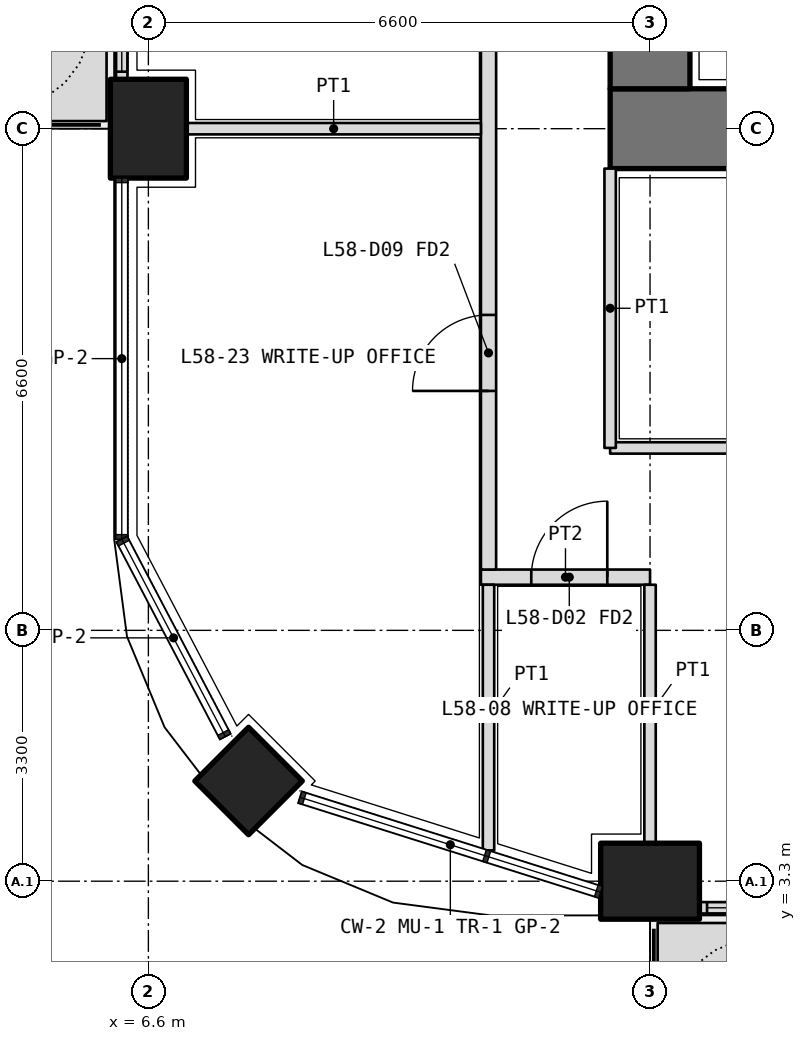
"""IFC4 building model, lengths in metres.
Left out: names, types, materials, properties, quantities, classifications, styles, units other than length and angle.
Written with IfcOpenShell. Run it as: python <this file> out.ifc"""

import sys

from ifc_helpers import new_model, si_unit, direction, frame, frame_2d, origin, origin_2d, place, context, subcontext, project, spatial, polyline, rectangle, outline, extrude, element, fill, save


model = new_model("IFC4")
c1 = context("Model", 3, precision=1e-05, world=origin(), true_north=direction((0.0, 1.0)))
c2 = subcontext(c1, "Body", "Model", "MODEL_VIEW")
j1 = project(units=[si_unit("LENGTHUNIT", "METRE"), si_unit("PLANEANGLEUNIT", "RADIAN")], contexts=[c1])
p1 = place(None, origin())
s1 = spatial("IfcSite", under=j1, at=p1, CompositionType="ELEMENT")
p2 = place(p1, origin())
s2 = spatial("IfcBuilding", under=s1, at=p2, CompositionType="ELEMENT")
p3 = place(p2, frame((0.0, 0.0, 254.4)))
s3 = spatial("IfcBuildingStorey", under=s2, at=p3, CompositionType="ELEMENT", Elevation=254.4)
p4 = place(p3, frame((7.918, 4.618, 0.0), z_axis=(0.0, 0.0, 1.0), x_axis=(0.707106781187, 0.707106781187, 0.0)))
e1 = element("IfcColumn", 1, at=p4, inside=s3, PredefinedType="COLUMN", context=c2, shape_type="SweptSolid", body=[
    extrude(rectangle(XDim=1.0, YDim=1.0, at=origin_2d()), origin(), (0.0, 0.0, 1.0), 4.2),
])
for number, where, z_axis, x_axis in (
    (2, (13.2, 3.3, 0.0), (0.0, 0.0, 1.0), (1.0, 0.0, 0.0)),
    (3, (6.6, 13.2, 0.0), (0.0, 0.0, 1.0), (0.0, 1.0, 0.0)),
):
    element("IfcColumn", number, at=place(p3, frame(where, z_axis=z_axis, x_axis=x_axis)), inside=s3, PredefinedType="COLUMN", context=c2, shape_type="SweptSolid", body=[
        extrude(rectangle(XDim=1.3, YDim=1.0, at=origin_2d()), origin(), (0.0, 0.0, 1.0), 4.2),
    ])
p5 = place(p3, origin())
e4 = element("IfcWall", 4, at=p5, inside=s3, PredefinedType="USERDEFINED", context=c2, shape_type="SweptSolid", body=[
    extrude(outline(polyline([(13.3, 1.75), (15.75, 1.75), (15.75, 2.75), (13.3, 2.75), (13.3, 1.75)]), holes=[polyline([(13.45, 1.9), (15.6, 1.9), (15.6, 2.6), (13.45, 2.6), (13.45, 1.9)])]), origin(), (0.0, 0.0, 1.0), 1.05),
])
p6 = place(p3, origin())
e5 = element("IfcWall", 5, at=p6, inside=s3, PredefinedType="USERDEFINED", context=c2, shape_type="SweptSolid", body=[
    extrude(outline(polyline([(5.05, 13.3), (6.05, 13.3), (6.05, 15.75), (5.05, 15.75), (5.05, 13.3)]), holes=[polyline([(5.2, 13.45), (5.9, 13.45), (5.9, 15.6), (5.2, 15.6), (5.2, 13.45)])]), origin(), (0.0, 0.0, 1.0), 1.05),
])
p7 = place(p3, frame((13.85, 2.95, 0.0), z_axis=(0.0, 0.0, 1.0), x_axis=(1.0, 0.0, 0.0)))
e6 = element("IfcWall", 6, at=p7, inside=s3, PredefinedType="SOLIDWALL", context=c2, shape_type="SweptSolid", body=[
    extrude(rectangle(XDim=5.3, YDim=0.15, at=frame_2d((2.65, 0.0))), origin(), (0.0, 0.0, 1.0), 2.7),
])
p8 = place(p7, frame((2.9, 0.0, 0.0)))
e7 = element("IfcOpeningElement", 7, at=p8, cuts=e6, PredefinedType="OPENING", context=c2, shape_type="SweptSolid", body=[
    extrude(rectangle(XDim=1.0, YDim=2.4, at=frame_2d((0.5, 1.2))), frame((0.0, 0.085, 0.0), z_axis=(0.0, -1.0, 0.0), x_axis=(1.0, 0.0, 0.0)), (0.0, 0.0, 1.0), 0.17),
])
p9 = place(p7, frame((0.1, 0.0, 0.1)))
e8 = element("IfcOpeningElement", 8, at=p9, cuts=e6, PredefinedType="OPENING", context=c2, shape_type="SweptSolid", body=[
    extrude(rectangle(XDim=2.3, YDim=2.3, at=frame_2d((1.15, 1.15))), frame((0.0, 0.085, 0.0), z_axis=(0.0, -1.0, 0.0), x_axis=(1.0, 0.0, 0.0)), (0.0, 0.0, 1.0), 0.17),
])
p10 = place(p7, frame((4.0, 0.0, 0.1)))
e9 = element("IfcOpeningElement", 9, at=p10, cuts=e6, PredefinedType="OPENING", context=c2, shape_type="SweptSolid", body=[
    extrude(rectangle(XDim=1.2, YDim=2.3, at=frame_2d((0.6, 1.15))), frame((0.0, 0.085, 0.0), z_axis=(0.0, -1.0, 0.0), x_axis=(1.0, 0.0, 0.0)), (0.0, 0.0, 1.0), 0.17),
])
p11 = place(p3, frame((6.25, 19.15, 0.0), z_axis=(0.0, 0.0, 1.0), x_axis=(0.0, -1.0, 0.0)))
e10 = element("IfcWall", 10, at=p11, inside=s3, PredefinedType="SOLIDWALL", context=c2, shape_type="SweptSolid", body=[
    extrude(rectangle(XDim=5.3, YDim=0.15, at=frame_2d((2.65, 0.0))), origin(), (0.0, 0.0, 1.0), 2.7),
])
p12 = place(p11, frame((1.4, 0.0, 0.0)))
e11 = element("IfcOpeningElement", 11, at=p12, cuts=e10, PredefinedType="OPENING", context=c2, shape_type="SweptSolid", body=[
    extrude(rectangle(XDim=1.0, YDim=2.4, at=frame_2d((0.5, 1.2))), frame((0.0, 0.085, 0.0), z_axis=(0.0, -1.0, 0.0), x_axis=(1.0, 0.0, 0.0)), (0.0, 0.0, 1.0), 0.17),
])
p13 = place(p11, frame((0.1, 0.0, 0.1)))
e12 = element("IfcOpeningElement", 12, at=p13, cuts=e10, PredefinedType="OPENING", context=c2, shape_type="SweptSolid", body=[
    extrude(rectangle(XDim=1.2, YDim=2.3, at=frame_2d((0.6, 1.15))), frame((0.0, 0.085, 0.0), z_axis=(0.0, -1.0, 0.0), x_axis=(1.0, 0.0, 0.0)), (0.0, 0.0, 1.0), 0.17),
])
p14 = place(p11, frame((2.9, 0.0, 0.1)))
e13 = element("IfcOpeningElement", 13, at=p14, cuts=e10, PredefinedType="OPENING", context=c2, shape_type="SweptSolid", body=[
    extrude(rectangle(XDim=2.3, YDim=2.3, at=frame_2d((1.15, 1.15))), frame((0.0, 0.085, 0.0), z_axis=(0.0, -1.0, 0.0), x_axis=(1.0, 0.0, 0.0)), (0.0, 0.0, 1.0), 0.17),
])
p15 = place(p3, frame((12.675, 13.2, 0.0), z_axis=(0.0, 0.0, 1.0), x_axis=(1.0, 0.0, 0.0)))
e14 = element("IfcWall", 14, at=p15, inside=s3, PredefinedType="SHEAR", context=c2, shape_type="SweptSolid", body=[
    extrude(rectangle(XDim=27.45, YDim=1.05, at=frame_2d((13.725, 0.0))), origin(), (0.0, 0.0, 1.0), 4.2),
])
p16 = place(p3, frame((13.2, 32.475, 0.0), z_axis=(0.0, 0.0, 1.0), x_axis=(0.0, -1.0, 0.0)))
e15 = element("IfcWall", 15, at=p16, inside=s3, PredefinedType="SHEAR", context=c2, shape_type="SweptSolid", body=[
    extrude(rectangle(XDim=18.75, YDim=1.05, at=frame_2d((9.375, 0.0))), origin(), (0.0, 0.0, 1.0), 4.2),
])
p17 = place(p16, frame((14.125, 0.0, 0.0)))
e16 = element("IfcOpeningElement", 16, at=p17, cuts=e15, PredefinedType="OPENING", context=c2, shape_type="SweptSolid", body=[
    extrude(rectangle(XDim=1.6, YDim=2.1, at=frame_2d((0.8, 1.05))), frame((0.0, 0.535, 0.0), z_axis=(0.0, -1.0, 0.0), x_axis=(1.0, 0.0, 0.0)), (0.0, 0.0, 1.0), 1.07),
])
p18 = place(p16, frame((3.325, 0.0, 0.0)))
e17 = element("IfcOpeningElement", 17, at=p18, cuts=e15, PredefinedType="OPENING", context=c2, shape_type="SweptSolid", body=[
    extrude(rectangle(XDim=1.6, YDim=2.1, at=frame_2d((0.8, 1.05))), frame((0.0, 0.535, 0.0), z_axis=(0.0, -1.0, 0.0), x_axis=(1.0, 0.0, 0.0)), (0.0, 0.0, 1.0), 1.07),
])
p19 = place(p3, frame((12.675, 9.0, 0.0), z_axis=(0.0, 0.0, 1.0), x_axis=(1.0, 0.0, 0.0)))
e18 = element("IfcWall", 18, at=p19, inside=s3, PredefinedType="PARTITIONING", context=c2, shape_type="SweptSolid", body=[
    extrude(rectangle(XDim=27.45, YDim=0.15, at=frame_2d((13.725, 0.0))), origin(), (0.0, 0.0, 1.0), 3.0),
])
p20 = place(p19, frame((4.712, 0.0, 0.0)))
e19 = element("IfcOpeningElement", 19, at=p20, cuts=e18, PredefinedType="OPENING", context=c2, shape_type="SweptSolid", body=[
    extrude(rectangle(XDim=1.0, YDim=2.1, at=frame_2d((0.5, 1.05))), frame((0.0, 0.085, 0.0), z_axis=(0.0, -1.0, 0.0), x_axis=(1.0, 0.0, 0.0)), (0.0, 0.0, 1.0), 0.17),
])
p21 = place(p19, frame((11.575, 0.0, 0.0)))
e20 = element("IfcOpeningElement", 20, at=p21, cuts=e18, PredefinedType="OPENING", context=c2, shape_type="SweptSolid", body=[
    extrude(rectangle(XDim=1.0, YDim=2.1, at=frame_2d((0.5, 1.05))), frame((0.0, 0.085, 0.0), z_axis=(0.0, -1.0, 0.0), x_axis=(1.0, 0.0, 0.0)), (0.0, 0.0, 1.0), 0.17),
])
p22 = place(p19, frame((18.175, 0.0, 0.0)))
e21 = element("IfcOpeningElement", 21, at=p22, cuts=e18, PredefinedType="OPENING", context=c2, shape_type="SweptSolid", body=[
    extrude(rectangle(XDim=1.0, YDim=2.1, at=frame_2d((0.5, 1.05))), frame((0.0, 0.085, 0.0), z_axis=(0.0, -1.0, 0.0), x_axis=(1.0, 0.0, 0.0)), (0.0, 0.0, 1.0), 0.17),
])
p23 = place(p19, frame((25.038, 0.0, 0.0)))
e22 = element("IfcOpeningElement", 22, at=p23, cuts=e18, PredefinedType="OPENING", context=c2, shape_type="SweptSolid", body=[
    extrude(rectangle(XDim=1.0, YDim=2.1, at=frame_2d((0.5, 1.05))), frame((0.0, 0.085, 0.0), z_axis=(0.0, -1.0, 0.0), x_axis=(1.0, 0.0, 0.0)), (0.0, 0.0, 1.0), 0.17),
])
p24 = place(p3, frame((12.675, 12.675, 0.0), z_axis=(0.0, 0.0, 1.0), x_axis=(0.0, -1.0, 0.0)))
e23 = element("IfcWall", 23, at=p24, inside=s3, PredefinedType="PARTITIONING", context=c2, shape_type="SweptSolid", body=[
    extrude(rectangle(XDim=3.675, YDim=0.15, at=frame_2d((1.837, 0.0))), origin(), (0.0, 0.0, 1.0), 3.0),
])
p25 = place(p3, frame((10.975, 7.3, 0.0), z_axis=(0.0, 0.0, 1.0), x_axis=(1.0, 0.0, 0.0)))
e24 = element("IfcWall", 24, at=p25, inside=s3, PredefinedType="PARTITIONING", context=c2, shape_type="SweptSolid", body=[
    extrude(rectangle(XDim=2.225, YDim=0.2, at=frame_2d((1.112, 0.0))), origin(), (0.0, 0.0, 1.0), 3.0),
])
p26 = place(p25, frame((0.663, 0.0, 0.0)))
e25 = element("IfcOpeningElement", 25, at=p26, cuts=e24, PredefinedType="OPENING", context=c2, shape_type="SweptSolid", body=[
    extrude(rectangle(XDim=1.0, YDim=2.1, at=frame_2d((0.5, 1.05))), frame((0.0, 0.11, 0.0), z_axis=(0.0, -1.0, 0.0), x_axis=(1.0, 0.0, 0.0)), (0.0, 0.0, 1.0), 0.22),
])
p27 = place(p3, frame((11.075, 7.4, 0.0), z_axis=(0.0, 0.0, 1.0), x_axis=(0.0, 1.0, 0.0)))
e26 = element("IfcWall", 26, at=p27, inside=s3, PredefinedType="PARTITIONING", context=c2, shape_type="SweptSolid", body=[
    extrude(rectangle(XDim=31.4, YDim=0.2, at=frame_2d((15.7, 0.0))), origin(), (0.0, 0.0, 1.0), 3.0),
])
p28 = place(p27, frame((2.35, 0.0, 0.0)))
e27 = element("IfcOpeningElement", 27, at=p28, cuts=e26, PredefinedType="OPENING", context=c2, shape_type="SweptSolid", body=[
    extrude(rectangle(XDim=1.0, YDim=2.1, at=frame_2d((0.5, 1.05))), frame((0.0, 0.11, 0.0), z_axis=(0.0, -1.0, 0.0), x_axis=(1.0, 0.0, 0.0)), (0.0, 0.0, 1.0), 0.22),
])
p29 = place(p27, frame((6.9, 0.0, 0.0)))
e28 = element("IfcOpeningElement", 28, at=p29, cuts=e26, PredefinedType="OPENING", context=c2, shape_type="SweptSolid", body=[
    extrude(rectangle(XDim=1.0, YDim=2.1, at=frame_2d((0.5, 1.05))), frame((0.0, 0.11, 0.0), z_axis=(0.0, -1.0, 0.0), x_axis=(1.0, 0.0, 0.0)), (0.0, 0.0, 1.0), 0.22),
])
p30 = place(p27, frame((10.35, 0.0, 0.0)))
e29 = element("IfcOpeningElement", 29, at=p30, cuts=e26, PredefinedType="OPENING", context=c2, shape_type="SweptSolid", body=[
    extrude(rectangle(XDim=0.9, YDim=2.1, at=frame_2d((0.45, 1.05))), frame((0.0, 0.11, 0.0), z_axis=(0.0, -1.0, 0.0), x_axis=(1.0, 0.0, 0.0)), (0.0, 0.0, 1.0), 0.22),
])
p31 = place(p27, frame((13.7, 0.0, 0.0)))
e30 = element("IfcOpeningElement", 30, at=p31, cuts=e26, PredefinedType="OPENING", context=c2, shape_type="SweptSolid", body=[
    extrude(rectangle(XDim=0.9, YDim=2.1, at=frame_2d((0.45, 1.05))), frame((0.0, 0.11, 0.0), z_axis=(0.0, -1.0, 0.0), x_axis=(1.0, 0.0, 0.0)), (0.0, 0.0, 1.0), 0.22),
])
p32 = place(p27, frame((16.85, 0.0, 0.0)))
e31 = element("IfcOpeningElement", 31, at=p32, cuts=e26, PredefinedType="OPENING", context=c2, shape_type="SweptSolid", body=[
    extrude(rectangle(XDim=1.0, YDim=2.1, at=frame_2d((0.5, 1.05))), frame((0.0, 0.11, 0.0), z_axis=(0.0, -1.0, 0.0), x_axis=(1.0, 0.0, 0.0)), (0.0, 0.0, 1.0), 0.22),
])
p33 = place(p27, frame((24.75, 0.0, 0.0)))
e32 = element("IfcOpeningElement", 32, at=p33, cuts=e26, PredefinedType="OPENING", context=c2, shape_type="SweptSolid", body=[
    extrude(rectangle(XDim=1.0, YDim=2.1, at=frame_2d((0.5, 1.05))), frame((0.0, 0.11, 0.0), z_axis=(0.0, -1.0, 0.0), x_axis=(1.0, 0.0, 0.0)), (0.0, 0.0, 1.0), 0.22),
])
p34 = place(p3, frame((11.075, 3.705, 0.0), z_axis=(0.0, 0.0, 1.0), x_axis=(0.0, 1.0, 0.0)))
e33 = element("IfcWall", 33, at=p34, inside=s3, PredefinedType="PARTITIONING", context=c2, shape_type="SweptSolid", body=[
    extrude(rectangle(XDim=3.495, YDim=0.15, at=frame_2d((1.748, 0.0))), origin(), (0.0, 0.0, 1.0), 2.7),
])
p35 = place(p3, frame((13.2, 3.8, 0.0), z_axis=(0.0, 0.0, 1.0), x_axis=(0.0, 1.0, 0.0)))
e34 = element("IfcWall", 34, at=p35, inside=s3, PredefinedType="PARTITIONING", context=c2, shape_type="SweptSolid", body=[
    extrude(rectangle(XDim=3.4, YDim=0.15, at=frame_2d((1.7, 0.0))), origin(), (0.0, 0.0, 1.0), 3.0),
])
p36 = place(p3, frame((7.1, 13.2, 0.0), z_axis=(0.0, 0.0, 1.0), x_axis=(1.0, 0.0, 0.0)))
e35 = element("IfcWall", 35, at=p36, inside=s3, PredefinedType="PARTITIONING", context=c2, shape_type="SweptSolid", body=[
    extrude(rectangle(XDim=3.875, YDim=0.15, at=frame_2d((1.938, 0.0))), origin(), (0.0, 0.0, 1.0), 3.0),
])
p37 = place(p9, origin())
e36 = element("IfcWindow", 36, at=p37, inside=s3, PartitioningType="SINGLE_PANEL", PredefinedType="WINDOW", context=c2, shape_type="SweptSolid", body=[
    extrude(rectangle(XDim=2.3, YDim=2.3, at=frame_2d((1.15, 1.15))), frame((0.0, 0.03, 0.0), z_axis=(0.0, -1.0, 0.0), x_axis=(1.0, 0.0, 0.0)), (0.0, 0.0, 1.0), 0.06),
])
fill(e8, e36)
p38 = place(p14, origin())
e37 = element("IfcWindow", 37, at=p38, inside=s3, PartitioningType="SINGLE_PANEL", PredefinedType="WINDOW", context=c2, shape_type="SweptSolid", body=[
    extrude(rectangle(XDim=2.3, YDim=2.3, at=frame_2d((1.15, 1.15))), frame((0.0, 0.03, 0.0), z_axis=(0.0, -1.0, 0.0), x_axis=(1.0, 0.0, 0.0)), (0.0, 0.0, 1.0), 0.06),
])
fill(e13, e37)
p39 = place(p26, origin())
e38 = element("IfcDoor", 38, at=p39, inside=s3, OperationType="SINGLE_SWING_RIGHT", PredefinedType="DOOR", context=c2, shape_type="SweptSolid", body=[
    extrude(rectangle(XDim=1.0, YDim=2.1, at=frame_2d((0.5, 1.05))), frame((0.0, 0.025, 0.0), z_axis=(0.0, -1.0, 0.0), x_axis=(1.0, 0.0, 0.0)), (0.0, 0.0, 1.0), 0.05),
])
fill(e25, e38)
p40 = place(p28, origin())
e39 = element("IfcDoor", 39, at=p40, inside=s3, OperationType="SINGLE_SWING_LEFT", PredefinedType="DOOR", context=c2, shape_type="SweptSolid", body=[
    extrude(rectangle(XDim=1.0, YDim=2.1, at=frame_2d((0.5, 1.05))), frame((0.0, 0.025, 0.0), z_axis=(0.0, -1.0, 0.0), x_axis=(1.0, 0.0, 0.0)), (0.0, 0.0, 1.0), 0.05),
])
fill(e27, e39)
save(model, sys.argv[1])
